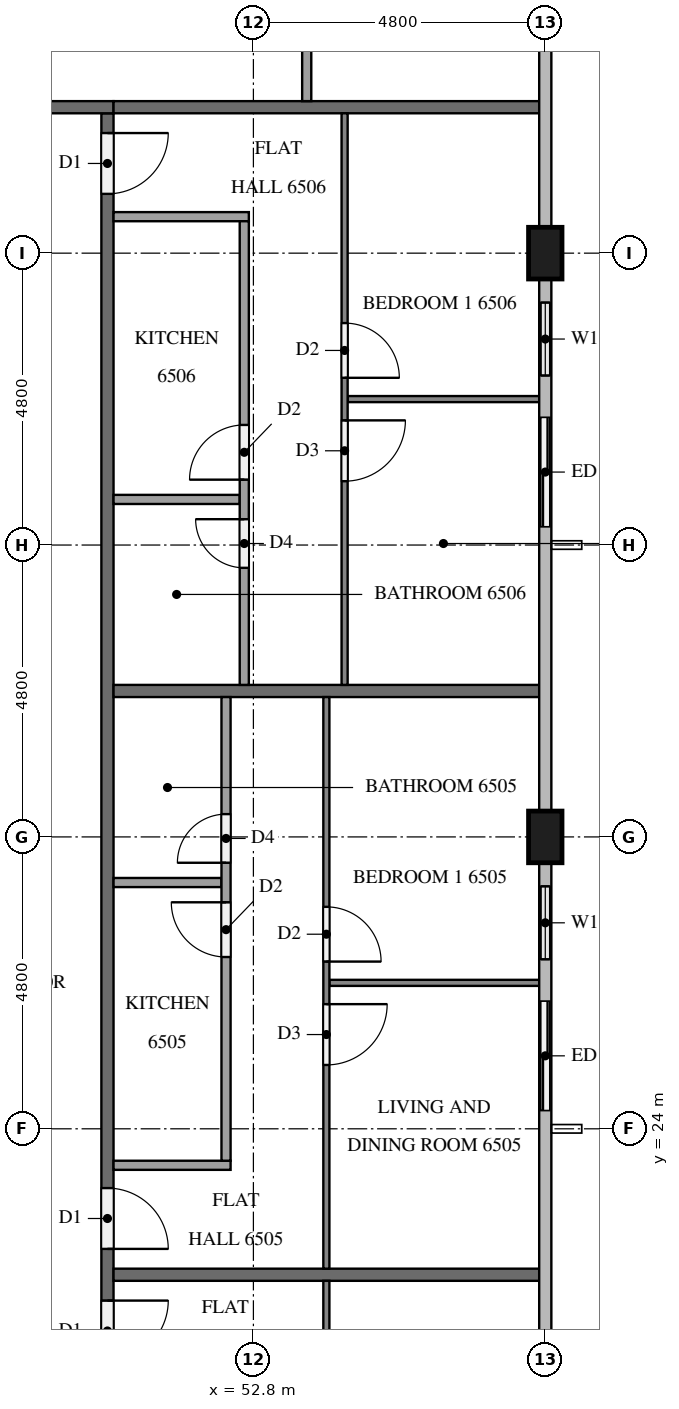
"""IFC4 building model, lengths in metres.
Left out: names, types, materials, properties, quantities, classifications, styles, units other than length and angle.
Written with IfcOpenShell. Run it as: python <this file> out.ifc"""

import sys

from ifc_helpers import new_model, si_unit, direction, frame, frame_2d, origin, origin_2d, place, context, subcontext, project, spatial, rectangle, extrude, element, fill, save


model = new_model("IFC4")
c1 = context("Model", 3, precision=1e-05, world=origin(), true_north=direction((0.0, 1.0)))
c2 = subcontext(c1, "Body", "Model", "MODEL_VIEW")
j1 = project(units=[si_unit("LENGTHUNIT", "METRE"), si_unit("PLANEANGLEUNIT", "RADIAN")], contexts=[c1])
p1 = place(None, origin())
s1 = spatial("IfcSite", under=j1, at=p1, CompositionType="ELEMENT")
p2 = place(p1, origin())
s2 = spatial("IfcBuilding", under=s1, at=p2, CompositionType="ELEMENT")
p3 = place(p2, frame((0.0, 0.0, 249.2)))
s3 = spatial("IfcBuildingStorey", under=s2, at=p3, CompositionType="ELEMENT", Elevation=249.2)
for number, where, z_axis, x_axis in (
    (1, (57.6, 28.8, 0.0), (0.0, 0.0, 1.0), (0.0, 1.0, 0.0)),
    (2, (57.6, 38.4, 0.0), (0.0, 0.0, 1.0), (0.0, 1.0, 0.0)),
):
    element("IfcColumn", number, at=place(p3, frame(where, z_axis=z_axis, x_axis=x_axis)), inside=s3, PredefinedType="COLUMN", context=c2, shape_type="SweptSolid", body=[
        extrude(rectangle(XDim=0.85, YDim=0.55, at=origin_2d()), origin(), (0.0, 0.0, 1.0), 3.2),
    ])
p4 = place(p3, frame((57.6, 24.0, 0.0), z_axis=(0.0, 0.0, 1.0), x_axis=(0.0, 1.0, 0.0)))
e3 = element("IfcWall", 3, at=p4, inside=s3, PredefinedType="SOLIDWALL", context=c2, shape_type="SweptSolid", body=[
    extrude(rectangle(XDim=4.375, YDim=0.15, at=frame_2d((2.188, 0.0))), origin(), (0.0, 0.0, 1.0), 3.2),
])
p5 = place(p4, frame((0.3, 0.0, 0.0)))
e4 = element("IfcOpeningElement", 4, at=p5, cuts=e3, PredefinedType="OPENING", context=c2, shape_type="SweptSolid", body=[
    extrude(rectangle(XDim=1.8, YDim=2.4, at=frame_2d((0.9, 1.2))), frame((0.0, 0.085, 0.0), z_axis=(0.0, -1.0, 0.0), x_axis=(1.0, 0.0, 0.0)), (0.0, 0.0, 1.0), 0.17),
])
p6 = place(p4, frame((2.788, 0.0, 0.9)))
e5 = element("IfcOpeningElement", 5, at=p6, cuts=e3, PredefinedType="OPENING", context=c2, shape_type="SweptSolid", body=[
    extrude(rectangle(XDim=1.2, YDim=1.4, at=frame_2d((0.6, 0.7))), frame((0.0, 0.085, 0.0), z_axis=(0.0, -1.0, 0.0), x_axis=(1.0, 0.0, 0.0)), (0.0, 0.0, 1.0), 0.17),
])
p7 = place(p3, frame((57.6, 33.6, 0.0), z_axis=(0.0, 0.0, 1.0), x_axis=(0.0, 1.0, 0.0)))
e6 = element("IfcWall", 6, at=p7, inside=s3, PredefinedType="SOLIDWALL", context=c2, shape_type="SweptSolid", body=[
    extrude(rectangle(XDim=4.375, YDim=0.15, at=frame_2d((2.188, 0.0))), origin(), (0.0, 0.0, 1.0), 3.2),
])
p8 = place(p7, frame((0.3, 0.0, 0.0)))
e7 = element("IfcOpeningElement", 7, at=p8, cuts=e6, PredefinedType="OPENING", context=c2, shape_type="SweptSolid", body=[
    extrude(rectangle(XDim=1.8, YDim=2.4, at=frame_2d((0.9, 1.2))), frame((0.0, 0.085, 0.0), z_axis=(0.0, -1.0, 0.0), x_axis=(1.0, 0.0, 0.0)), (0.0, 0.0, 1.0), 0.17),
])
p9 = place(p7, frame((2.788, 0.0, 0.9)))
e8 = element("IfcOpeningElement", 8, at=p9, cuts=e6, PredefinedType="OPENING", context=c2, shape_type="SweptSolid", body=[
    extrude(rectangle(XDim=1.2, YDim=1.4, at=frame_2d((0.6, 0.7))), frame((0.0, 0.085, 0.0), z_axis=(0.0, -1.0, 0.0), x_axis=(1.0, 0.0, 0.0)), (0.0, 0.0, 1.0), 0.17),
])
p10 = place(p3, frame((50.4, 40.7, 0.0), z_axis=(0.0, 0.0, 1.0), x_axis=(0.0, -1.0, 0.0)))
e9 = element("IfcWall", 9, at=p10, inside=s3, PredefinedType="PARTITIONING", context=c2, shape_type="SweptSolid", body=[
    extrude(rectangle(XDim=28.6, YDim=0.2, at=frame_2d((14.3, 0.0))), origin(), (0.0, 0.0, 1.0), 3.2),
])
p11 = place(p10, frame((19.525, 0.0, 0.0)))
e10 = element("IfcOpeningElement", 10, at=p11, cuts=e9, PredefinedType="OPENING", context=c2, shape_type="SweptSolid", body=[
    extrude(rectangle(XDim=1.0, YDim=2.1, at=frame_2d((0.5, 1.05))), frame((0.0, 0.11, 0.0), z_axis=(0.0, -1.0, 0.0), x_axis=(1.0, 0.0, 0.0)), (0.0, 0.0, 1.0), 0.22),
])
p12 = place(p10, frame((17.675, 0.0, 0.0)))
e11 = element("IfcOpeningElement", 11, at=p12, cuts=e9, PredefinedType="OPENING", context=c2, shape_type="SweptSolid", body=[
    extrude(rectangle(XDim=1.0, YDim=2.1, at=frame_2d((0.5, 1.05))), frame((0.0, 0.11, 0.0), z_axis=(0.0, -1.0, 0.0), x_axis=(1.0, 0.0, 0.0)), (0.0, 0.0, 1.0), 0.22),
])
p13 = place(p10, frame((0.325, 0.0, 0.0)))
e12 = element("IfcOpeningElement", 12, at=p13, cuts=e9, PredefinedType="OPENING", context=c2, shape_type="SweptSolid", body=[
    extrude(rectangle(XDim=1.0, YDim=2.1, at=frame_2d((0.5, 1.05))), frame((0.0, 0.11, 0.0), z_axis=(0.0, -1.0, 0.0), x_axis=(1.0, 0.0, 0.0)), (0.0, 0.0, 1.0), 0.22),
])
p14 = place(p3, frame((11.9, 40.8, 0.0), z_axis=(0.0, 0.0, 1.0), x_axis=(1.0, 0.0, 0.0)))
e13 = element("IfcWall", 13, at=p14, inside=s3, PredefinedType="PARTITIONING", context=c2, shape_type="SweptSolid", body=[
    extrude(rectangle(XDim=38.6, YDim=0.2, at=frame_2d((19.3, 0.0))), origin(), (0.0, 0.0, 1.0), 3.2),
])
p15 = place(p14, frame((31.725, 0.0, 0.0)))
e14 = element("IfcOpeningElement", 14, at=p15, cuts=e13, PredefinedType="OPENING", context=c2, shape_type="SweptSolid", body=[
    extrude(rectangle(XDim=1.0, YDim=2.1, at=frame_2d((0.5, 1.05))), frame((0.0, 0.11, 0.0), z_axis=(0.0, -1.0, 0.0), x_axis=(1.0, 0.0, 0.0)), (0.0, 0.0, 1.0), 0.22),
])
p16 = place(p14, frame((17.325, 0.0, 0.0)))
e15 = element("IfcOpeningElement", 15, at=p16, cuts=e13, PredefinedType="OPENING", context=c2, shape_type="SweptSolid", body=[
    extrude(rectangle(XDim=1.0, YDim=2.1, at=frame_2d((0.5, 1.05))), frame((0.0, 0.11, 0.0), z_axis=(0.0, -1.0, 0.0), x_axis=(1.0, 0.0, 0.0)), (0.0, 0.0, 1.0), 0.22),
])
p17 = place(p14, frame((0.525, 0.0, 0.0)))
e16 = element("IfcOpeningElement", 16, at=p17, cuts=e13, PredefinedType="OPENING", context=c2, shape_type="SweptSolid", body=[
    extrude(rectangle(XDim=1.0, YDim=2.1, at=frame_2d((0.5, 1.05))), frame((0.0, 0.11, 0.0), z_axis=(0.0, -1.0, 0.0), x_axis=(1.0, 0.0, 0.0)), (0.0, 0.0, 1.0), 0.22),
])
for number, where, z_axis, x_axis in (
    (17, (50.5, 21.6, 0.0), (0.0, 0.0, 1.0), (1.0, 0.0, 0.0)),
    (18, (50.5, 31.2, 0.0), (0.0, 0.0, 1.0), (1.0, 0.0, 0.0)),
    (19, (50.5, 40.8, 0.0), (0.0, 0.0, 1.0), (1.0, 0.0, 0.0)),
):
    element("IfcWall", number, at=place(p3, frame(where, z_axis=z_axis, x_axis=x_axis)), inside=s3, PredefinedType="PARTITIONING", context=c2, shape_type="SweptSolid", body=[
        extrude(rectangle(XDim=7.0, YDim=0.2, at=frame_2d((3.5, 0.0))), origin(), (0.0, 0.0, 1.0), 3.2),
    ])
p18 = place(p3, frame((54.0, 21.5, 0.0), z_axis=(0.0, 0.0, 1.0), x_axis=(0.0, -1.0, 0.0)))
e20 = element("IfcWall", 20, at=p18, inside=s3, PredefinedType="PARTITIONING", context=c2, shape_type="SweptSolid", body=[
    extrude(rectangle(XDim=16.279, YDim=0.1, at=frame_2d((8.139, 0.0))), origin(), (0.0, 0.0, 1.0), 3.2),
])
p19 = place(p18, frame((3.45, 0.0, 0.0)))
e21 = element("IfcOpeningElement", 21, at=p19, cuts=e20, PredefinedType="OPENING", context=c2, shape_type="SweptSolid", body=[
    extrude(rectangle(XDim=0.9, YDim=2.1, at=frame_2d((0.45, 1.05))), frame((0.0, 0.06, 0.0), z_axis=(0.0, -1.0, 0.0), x_axis=(1.0, 0.0, 0.0)), (0.0, 0.0, 1.0), 0.12),
])
p20 = place(p18, frame((5.05, 0.0, 0.0)))
e22 = element("IfcOpeningElement", 22, at=p20, cuts=e20, PredefinedType="OPENING", context=c2, shape_type="SweptSolid", body=[
    extrude(rectangle(XDim=0.9, YDim=2.1, at=frame_2d((0.45, 1.05))), frame((0.0, 0.06, 0.0), z_axis=(0.0, -1.0, 0.0), x_axis=(1.0, 0.0, 0.0)), (0.0, 0.0, 1.0), 0.12),
])
p21 = place(p18, frame((14.979, 0.0, 0.0)))
e23 = element("IfcOpeningElement", 23, at=p21, cuts=e20, PredefinedType="OPENING", context=c2, shape_type="SweptSolid", body=[
    extrude(rectangle(XDim=1.0, YDim=2.1, at=frame_2d((0.5, 1.05))), frame((0.0, 0.06, 0.0), z_axis=(0.0, -1.0, 0.0), x_axis=(1.0, 0.0, 0.0)), (0.0, 0.0, 1.0), 0.12),
])
p22 = place(p3, frame((54.05, 26.4, 0.0), z_axis=(0.0, 0.0, 1.0), x_axis=(1.0, 0.0, 0.0)))
e24 = element("IfcWall", 24, at=p22, inside=s3, PredefinedType="PARTITIONING", context=c2, shape_type="SweptSolid", body=[
    extrude(rectangle(XDim=3.45, YDim=0.1, at=frame_2d((1.725, 0.0))), origin(), (0.0, 0.0, 1.0), 3.2),
])
p23 = place(p3, frame((54.0, 31.1, 0.0), z_axis=(0.0, 0.0, 1.0), x_axis=(0.0, -1.0, 0.0)))
e25 = element("IfcWall", 25, at=p23, inside=s3, PredefinedType="PARTITIONING", context=c2, shape_type="SweptSolid", body=[
    extrude(rectangle(XDim=9.4, YDim=0.1, at=frame_2d((4.7, 0.0))), origin(), (0.0, 0.0, 1.0), 3.2),
])
p24 = place(p23, frame((5.05, 0.0, 0.0)))
e26 = element("IfcOpeningElement", 26, at=p24, cuts=e25, PredefinedType="OPENING", context=c2, shape_type="SweptSolid", body=[
    extrude(rectangle(XDim=1.0, YDim=2.1, at=frame_2d((0.5, 1.05))), frame((0.0, 0.06, 0.0), z_axis=(0.0, -1.0, 0.0), x_axis=(1.0, 0.0, 0.0)), (0.0, 0.0, 1.0), 0.12),
])
p25 = place(p23, frame((3.45, 0.0, 0.0)))
e27 = element("IfcOpeningElement", 27, at=p25, cuts=e25, PredefinedType="OPENING", context=c2, shape_type="SweptSolid", body=[
    extrude(rectangle(XDim=0.9, YDim=2.1, at=frame_2d((0.45, 1.05))), frame((0.0, 0.06, 0.0), z_axis=(0.0, -1.0, 0.0), x_axis=(1.0, 0.0, 0.0)), (0.0, 0.0, 1.0), 0.12),
])
p26 = place(p3, frame((50.5, 28.05, 0.0), z_axis=(0.0, 0.0, 1.0), x_axis=(1.0, 0.0, 0.0)))
e28 = element("IfcWall", 28, at=p26, inside=s3, PredefinedType="PARTITIONING", context=c2, shape_type="SweptSolid", body=[
    extrude(rectangle(XDim=1.775, YDim=0.15, at=frame_2d((0.887, 0.0))), origin(), (0.0, 0.0, 1.0), 3.2),
])
p27 = place(p3, frame((50.5, 23.4, 0.0), z_axis=(0.0, 0.0, 1.0), x_axis=(1.0, 0.0, 0.0)))
e29 = element("IfcWall", 29, at=p27, inside=s3, PredefinedType="PARTITIONING", context=c2, shape_type="SweptSolid", body=[
    extrude(rectangle(XDim=1.925, YDim=0.15, at=frame_2d((0.962, 0.0))), origin(), (0.0, 0.0, 1.0), 3.2),
])
p28 = place(p3, frame((52.35, 23.475, 0.0), z_axis=(0.0, 0.0, 1.0), x_axis=(0.0, 1.0, 0.0)))
e30 = element("IfcWall", 30, at=p28, inside=s3, PredefinedType="PARTITIONING", context=c2, shape_type="SweptSolid", body=[
    extrude(rectangle(XDim=7.625, YDim=0.15, at=frame_2d((3.812, 0.0))), origin(), (0.0, 0.0, 1.0), 3.2),
])
p29 = place(p28, frame((3.35, 0.0, 0.0)))
e31 = element("IfcOpeningElement", 31, at=p29, cuts=e30, PredefinedType="OPENING", context=c2, shape_type="SweptSolid", body=[
    extrude(rectangle(XDim=0.9, YDim=2.1, at=frame_2d((0.45, 1.05))), frame((0.0, 0.085, 0.0), z_axis=(0.0, -1.0, 0.0), x_axis=(1.0, 0.0, 0.0)), (0.0, 0.0, 1.0), 0.17),
])
p30 = place(p28, frame((4.9, 0.0, 0.0)))
e32 = element("IfcOpeningElement", 32, at=p30, cuts=e30, PredefinedType="OPENING", context=c2, shape_type="SweptSolid", body=[
    extrude(rectangle(XDim=0.8, YDim=2.1, at=frame_2d((0.4, 1.05))), frame((0.0, 0.085, 0.0), z_axis=(0.0, -1.0, 0.0), x_axis=(1.0, 0.0, 0.0)), (0.0, 0.0, 1.0), 0.17),
])
p31 = place(p3, frame((54.35, 36.0, 0.0), z_axis=(0.0, 0.0, 1.0), x_axis=(1.0, 0.0, 0.0)))
e33 = element("IfcWall", 33, at=p31, inside=s3, PredefinedType="PARTITIONING", context=c2, shape_type="SweptSolid", body=[
    extrude(rectangle(XDim=3.15, YDim=0.1, at=frame_2d((1.575, 0.0))), origin(), (0.0, 0.0, 1.0), 3.2),
])
p32 = place(p3, frame((54.3, 40.7, 0.0), z_axis=(0.0, 0.0, 1.0), x_axis=(0.0, -1.0, 0.0)))
e34 = element("IfcWall", 34, at=p32, inside=s3, PredefinedType="PARTITIONING", context=c2, shape_type="SweptSolid", body=[
    extrude(rectangle(XDim=9.4, YDim=0.1, at=frame_2d((4.7, 0.0))), origin(), (0.0, 0.0, 1.0), 3.2),
])
p33 = place(p32, frame((3.45, 0.0, 0.0)))
e35 = element("IfcOpeningElement", 35, at=p33, cuts=e34, PredefinedType="OPENING", context=c2, shape_type="SweptSolid", body=[
    extrude(rectangle(XDim=0.9, YDim=2.1, at=frame_2d((0.45, 1.05))), frame((0.0, 0.06, 0.0), z_axis=(0.0, -1.0, 0.0), x_axis=(1.0, 0.0, 0.0)), (0.0, 0.0, 1.0), 0.12),
])
p34 = place(p32, frame((5.05, 0.0, 0.0)))
e36 = element("IfcOpeningElement", 36, at=p34, cuts=e34, PredefinedType="OPENING", context=c2, shape_type="SweptSolid", body=[
    extrude(rectangle(XDim=1.0, YDim=2.1, at=frame_2d((0.5, 1.05))), frame((0.0, 0.06, 0.0), z_axis=(0.0, -1.0, 0.0), x_axis=(1.0, 0.0, 0.0)), (0.0, 0.0, 1.0), 0.12),
])
p35 = place(p3, frame((50.5, 34.35, 0.0), z_axis=(0.0, 0.0, 1.0), x_axis=(1.0, 0.0, 0.0)))
e37 = element("IfcWall", 37, at=p35, inside=s3, PredefinedType="PARTITIONING", context=c2, shape_type="SweptSolid", body=[
    extrude(rectangle(XDim=2.075, YDim=0.15, at=frame_2d((1.038, 0.0))), origin(), (0.0, 0.0, 1.0), 3.2),
])
p36 = place(p3, frame((50.5, 39.0, 0.0), z_axis=(0.0, 0.0, 1.0), x_axis=(1.0, 0.0, 0.0)))
e38 = element("IfcWall", 38, at=p36, inside=s3, PredefinedType="PARTITIONING", context=c2, shape_type="SweptSolid", body=[
    extrude(rectangle(XDim=2.225, YDim=0.15, at=frame_2d((1.113, 0.0))), origin(), (0.0, 0.0, 1.0), 3.2),
])
p37 = place(p3, frame((52.65, 31.3, 0.0), z_axis=(0.0, 0.0, 1.0), x_axis=(0.0, 1.0, 0.0)))
e39 = element("IfcWall", 39, at=p37, inside=s3, PredefinedType="PARTITIONING", context=c2, shape_type="SweptSolid", body=[
    extrude(rectangle(XDim=7.625, YDim=0.15, at=frame_2d((3.812, 0.0))), origin(), (0.0, 0.0, 1.0), 3.2),
])
p38 = place(p37, frame((3.375, 0.0, 0.0)))
e40 = element("IfcOpeningElement", 40, at=p38, cuts=e39, PredefinedType="OPENING", context=c2, shape_type="SweptSolid", body=[
    extrude(rectangle(XDim=0.9, YDim=2.1, at=frame_2d((0.45, 1.05))), frame((0.0, 0.085, 0.0), z_axis=(0.0, -1.0, 0.0), x_axis=(1.0, 0.0, 0.0)), (0.0, 0.0, 1.0), 0.17),
])
p39 = place(p37, frame((1.925, 0.0, 0.0)))
e41 = element("IfcOpeningElement", 41, at=p39, cuts=e39, PredefinedType="OPENING", context=c2, shape_type="SweptSolid", body=[
    extrude(rectangle(XDim=0.8, YDim=2.1, at=frame_2d((0.4, 1.05))), frame((0.0, 0.085, 0.0), z_axis=(0.0, -1.0, 0.0), x_axis=(1.0, 0.0, 0.0)), (0.0, 0.0, 1.0), 0.17),
])
p40 = place(p3, frame((53.677, 40.9, 0.0), z_axis=(0.0, 0.0, 1.0), x_axis=(0.0, 1.0, 0.0)))
e42 = element("IfcWall", 42, at=p40, inside=s3, PredefinedType="PARTITIONING", context=c2, shape_type="SweptSolid", body=[
    extrude(rectangle(XDim=2.975, YDim=0.15, at=frame_2d((1.488, 0.0))), origin(), (0.0, 0.0, 1.0), 3.2),
])
p41 = place(p5, origin())
e43 = element("IfcDoor", 43, at=p41, inside=s3, OperationType="SLIDING_TO_LEFT", PredefinedType="DOOR", context=c2, shape_type="SweptSolid", body=[
    extrude(rectangle(XDim=1.8, YDim=2.4, at=frame_2d((0.9, 1.2))), frame((0.0, 0.025, 0.0), z_axis=(0.0, -1.0, 0.0), x_axis=(1.0, 0.0, 0.0)), (0.0, 0.0, 1.0), 0.05),
])
fill(e4, e43)
p42 = place(p6, origin())
e44 = element("IfcWindow", 44, at=p42, inside=s3, PartitioningType="SINGLE_PANEL", PredefinedType="WINDOW", context=c2, shape_type="SweptSolid", body=[
    extrude(rectangle(XDim=1.2, YDim=1.4, at=frame_2d((0.6, 0.7))), frame((0.0, 0.03, 0.0), z_axis=(0.0, -1.0, 0.0), x_axis=(1.0, 0.0, 0.0)), (0.0, 0.0, 1.0), 0.06),
])
fill(e5, e44)
p43 = place(p8, origin())
e45 = element("IfcDoor", 45, at=p43, inside=s3, OperationType="SLIDING_TO_RIGHT", PredefinedType="DOOR", context=c2, shape_type="SweptSolid", body=[
    extrude(rectangle(XDim=1.8, YDim=2.4, at=frame_2d((0.9, 1.2))), frame((0.0, 0.025, 0.0), z_axis=(0.0, -1.0, 0.0), x_axis=(1.0, 0.0, 0.0)), (0.0, 0.0, 1.0), 0.05),
])
fill(e7, e45)
p44 = place(p9, origin())
e46 = element("IfcWindow", 46, at=p44, inside=s3, PartitioningType="SINGLE_PANEL", PredefinedType="WINDOW", context=c2, shape_type="SweptSolid", body=[
    extrude(rectangle(XDim=1.2, YDim=1.4, at=frame_2d((0.6, 0.7))), frame((0.0, 0.03, 0.0), z_axis=(0.0, -1.0, 0.0), x_axis=(1.0, 0.0, 0.0)), (0.0, 0.0, 1.0), 0.06),
])
fill(e8, e46)
p45 = place(p11, origin())
e47 = element("IfcDoor", 47, at=p45, inside=s3, OperationType="SINGLE_SWING_LEFT", PredefinedType="DOOR", context=c2, shape_type="SweptSolid", body=[
    extrude(rectangle(XDim=1.0, YDim=2.1, at=frame_2d((0.5, 1.05))), frame((0.0, 0.025, 0.0), z_axis=(0.0, -1.0, 0.0), x_axis=(1.0, 0.0, 0.0)), (0.0, 0.0, 1.0), 0.05),
])
fill(e10, e47)
p46 = place(p12, origin())
e48 = element("IfcDoor", 48, at=p46, inside=s3, OperationType="SINGLE_SWING_RIGHT", PredefinedType="DOOR", context=c2, shape_type="SweptSolid", body=[
    extrude(rectangle(XDim=1.0, YDim=2.1, at=frame_2d((0.5, 1.05))), frame((0.0, 0.025, 0.0), z_axis=(0.0, -1.0, 0.0), x_axis=(1.0, 0.0, 0.0)), (0.0, 0.0, 1.0), 0.05),
])
fill(e11, e48)
p47 = place(p13, origin())
e49 = element("IfcDoor", 49, at=p47, inside=s3, OperationType="SINGLE_SWING_LEFT", PredefinedType="DOOR", context=c2, shape_type="SweptSolid", body=[
    extrude(rectangle(XDim=1.0, YDim=2.1, at=frame_2d((0.5, 1.05))), frame((0.0, 0.025, 0.0), z_axis=(0.0, -1.0, 0.0), x_axis=(1.0, 0.0, 0.0)), (0.0, 0.0, 1.0), 0.05),
])
fill(e12, e49)
p48 = place(p24, origin())
e50 = element("IfcDoor", 50, at=p48, inside=s3, OperationType="SINGLE_SWING_LEFT", PredefinedType="DOOR", context=c2, shape_type="SweptSolid", body=[
    extrude(rectangle(XDim=1.0, YDim=2.1, at=frame_2d((0.5, 1.05))), frame((0.0, 0.025, 0.0), z_axis=(0.0, -1.0, 0.0), x_axis=(1.0, 0.0, 0.0)), (0.0, 0.0, 1.0), 0.05),
])
fill(e26, e50)
p49 = place(p25, origin())
e51 = element("IfcDoor", 51, at=p49, inside=s3, OperationType="SINGLE_SWING_RIGHT", PredefinedType="DOOR", context=c2, shape_type="SweptSolid", body=[
    extrude(rectangle(XDim=0.9, YDim=2.1, at=frame_2d((0.45, 1.05))), frame((0.0, 0.025, 0.0), z_axis=(0.0, -1.0, 0.0), x_axis=(1.0, 0.0, 0.0)), (0.0, 0.0, 1.0), 0.05),
])
fill(e27, e51)
p50 = place(p29, origin())
e52 = element("IfcDoor", 52, at=p50, inside=s3, OperationType="SINGLE_SWING_RIGHT", PredefinedType="DOOR", context=c2, shape_type="SweptSolid", body=[
    extrude(rectangle(XDim=0.9, YDim=2.1, at=frame_2d((0.45, 1.05))), frame((0.0, 0.025, 0.0), z_axis=(0.0, -1.0, 0.0), x_axis=(1.0, 0.0, 0.0)), (0.0, 0.0, 1.0), 0.05),
])
fill(e31, e52)
p51 = place(p30, origin())
e53 = element("IfcDoor", 53, at=p51, inside=s3, OperationType="SINGLE_SWING_LEFT", PredefinedType="DOOR", context=c2, shape_type="SweptSolid", body=[
    extrude(rectangle(XDim=0.8, YDim=2.1, at=frame_2d((0.4, 1.05))), frame((0.0, 0.025, 0.0), z_axis=(0.0, -1.0, 0.0), x_axis=(1.0, 0.0, 0.0)), (0.0, 0.0, 1.0), 0.05),
])
fill(e32, e53)
p52 = place(p33, origin())
e54 = element("IfcDoor", 54, at=p52, inside=s3, OperationType="SINGLE_SWING_RIGHT", PredefinedType="DOOR", context=c2, shape_type="SweptSolid", body=[
    extrude(rectangle(XDim=0.9, YDim=2.1, at=frame_2d((0.45, 1.05))), frame((0.0, 0.025, 0.0), z_axis=(0.0, -1.0, 0.0), x_axis=(1.0, 0.0, 0.0)), (0.0, 0.0, 1.0), 0.05),
])
fill(e35, e54)
p53 = place(p34, origin())
e55 = element("IfcDoor", 55, at=p53, inside=s3, OperationType="SINGLE_SWING_LEFT", PredefinedType="DOOR", context=c2, shape_type="SweptSolid", body=[
    extrude(rectangle(XDim=1.0, YDim=2.1, at=frame_2d((0.5, 1.05))), frame((0.0, 0.025, 0.0), z_axis=(0.0, -1.0, 0.0), x_axis=(1.0, 0.0, 0.0)), (0.0, 0.0, 1.0), 0.05),
])
fill(e36, e55)
p54 = place(p38, origin())
e56 = element("IfcDoor", 56, at=p54, inside=s3, OperationType="SINGLE_SWING_LEFT", PredefinedType="DOOR", context=c2, shape_type="SweptSolid", body=[
    extrude(rectangle(XDim=0.9, YDim=2.1, at=frame_2d((0.45, 1.05))), frame((0.0, 0.025, 0.0), z_axis=(0.0, -1.0, 0.0), x_axis=(1.0, 0.0, 0.0)), (0.0, 0.0, 1.0), 0.05),
])
fill(e40, e56)
p55 = place(p39, origin())
e57 = element("IfcDoor", 57, at=p55, inside=s3, OperationType="SINGLE_SWING_RIGHT", PredefinedType="DOOR", context=c2, shape_type="SweptSolid", body=[
    extrude(rectangle(XDim=0.8, YDim=2.1, at=frame_2d((0.4, 1.05))), frame((0.0, 0.025, 0.0), z_axis=(0.0, -1.0, 0.0), x_axis=(1.0, 0.0, 0.0)), (0.0, 0.0, 1.0), 0.05),
])
fill(e41, e57)
save(model, sys.argv[1])
